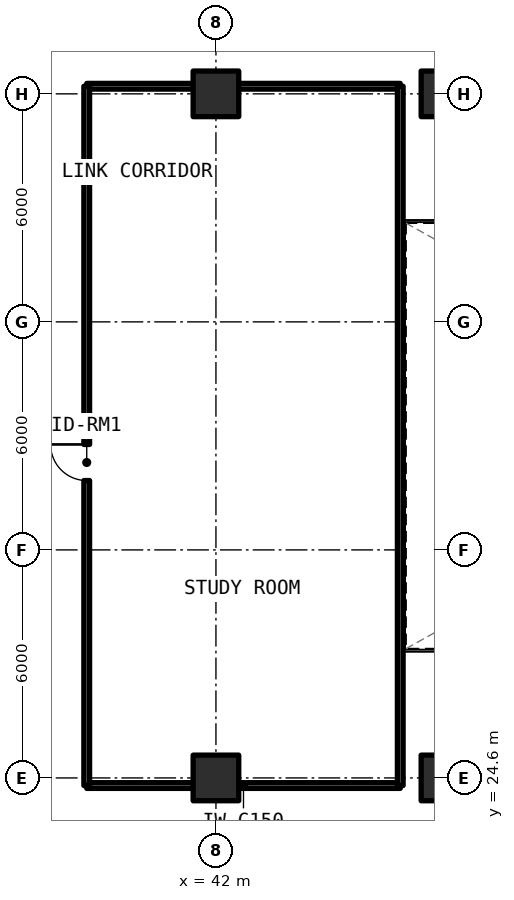
"""IFC4 building model, lengths in metres.
Left out: names, types, materials, properties, quantities, classifications, styles, units other than length and angle.
Written with IfcOpenShell. Run it as: python <this file> out.ifc"""

import sys

from ifc_helpers import new_model, si_unit, direction, frame, frame_2d, origin, origin_2d, place, context, subcontext, project, spatial, rectangle, extrude, element, fill, save


model = new_model("IFC4")
c1 = context("Model", 3, precision=1e-05, world=origin(), true_north=direction((0.0, 1.0)))
c2 = subcontext(c1, "Body", "Model", "MODEL_VIEW")
j1 = project(units=[si_unit("LENGTHUNIT", "METRE"), si_unit("PLANEANGLEUNIT", "RADIAN")], contexts=[c1])
p1 = place(None, origin())
s1 = spatial("IfcSite", under=j1, at=p1, CompositionType="ELEMENT")
p2 = place(p1, origin())
s2 = spatial("IfcBuilding", under=s1, at=p2, CompositionType="ELEMENT")
p3 = place(p2, frame((0.0, 0.0, 35.64)))
s3 = spatial("IfcBuildingStorey", under=s2, at=p3, CompositionType="ELEMENT", Elevation=35.64)
for number, where, z_axis, x_axis in (
    (1, (42.0, 24.6, 0.0), (0.0, 0.0, 1.0), (1.0, 0.0, 0.0)),
    (2, (42.0, 42.6, 0.0), (0.0, 0.0, 1.0), (1.0, 0.0, 0.0)),
    (3, (48.0, 24.6, 0.0), (0.0, 0.0, 1.0), (1.0, 0.0, 0.0)),
    (4, (48.0, 42.6, 0.0), (0.0, 0.0, 1.0), (1.0, 0.0, 0.0)),
):
    element("IfcColumn", number, at=place(p3, frame(where, z_axis=z_axis, x_axis=x_axis)), inside=s3, PredefinedType="COLUMN", context=c2, shape_type="SweptSolid", body=[
        extrude(rectangle(XDim=1.2, YDim=1.2, at=origin_2d()), origin(), (0.0, 0.0, 1.0), 3.3),
    ])
for number, where, z_axis, x_axis in (
    (5, (38.6, 24.4, 0.0), (0.0, 0.0, 1.0), (1.0, 0.0, 0.0)),
    (6, (38.6, 42.8, 0.0), (0.0, 0.0, 1.0), (1.0, 0.0, 0.0)),
):
    element("IfcWall", number, at=place(p3, frame(where, z_axis=z_axis, x_axis=x_axis)), inside=s3, PredefinedType="SOLIDWALL", context=c2, shape_type="SweptSolid", body=[
        extrude(rectangle(XDim=8.25, YDim=0.15, at=frame_2d((4.125, 0.0))), origin(), (0.0, 0.0, 1.0), 2.295),
    ])
p4 = place(p3, frame((38.6, 24.4, 0.0), z_axis=(0.0, 0.0, 1.0), x_axis=(0.0, 1.0, 0.0)))
e7 = element("IfcWall", 7, at=p4, inside=s3, PredefinedType="SOLIDWALL", context=c2, shape_type="SweptSolid", body=[
    extrude(rectangle(XDim=18.4, YDim=0.15, at=frame_2d((9.2, 0.0))), origin(), (0.0, 0.0, 1.0), 2.35),
])
p5 = place(p4, frame((8.025, 0.0, 0.0)))
e8 = element("IfcOpeningElement", 8, at=p5, cuts=e7, PredefinedType="OPENING", context=c2, shape_type="SweptSolid", body=[
    extrude(rectangle(XDim=0.95, YDim=2.15, at=frame_2d((0.475, 1.075))), frame((0.0, 0.085, 0.0), z_axis=(0.0, -1.0, 0.0), x_axis=(1.0, 0.0, 0.0)), (0.0, 0.0, 1.0), 0.17),
])
p6 = place(p3, frame((46.85, 24.4, 0.0), z_axis=(0.0, 0.0, 1.0), x_axis=(0.0, 1.0, 0.0)))
e9 = element("IfcWall", 9, at=p6, inside=s3, PredefinedType="SOLIDWALL", context=c2, shape_type="SweptSolid", body=[
    extrude(rectangle(XDim=18.4, YDim=0.15, at=frame_2d((9.2, 0.0))), origin(), (0.0, 0.0, 1.0), 2.35),
])
p7 = place(p5, origin())
e10 = element("IfcDoor", 10, at=p7, inside=s3, OperationType="SINGLE_SWING_RIGHT", PredefinedType="DOOR", context=c2, shape_type="SweptSolid", body=[
    extrude(rectangle(XDim=0.95, YDim=2.15, at=frame_2d((0.475, 1.075))), frame((0.0, 0.025, 0.0), z_axis=(0.0, -1.0, 0.0), x_axis=(1.0, 0.0, 0.0)), (0.0, 0.0, 1.0), 0.05),
])
fill(e8, e10)
save(model, sys.argv[1])
